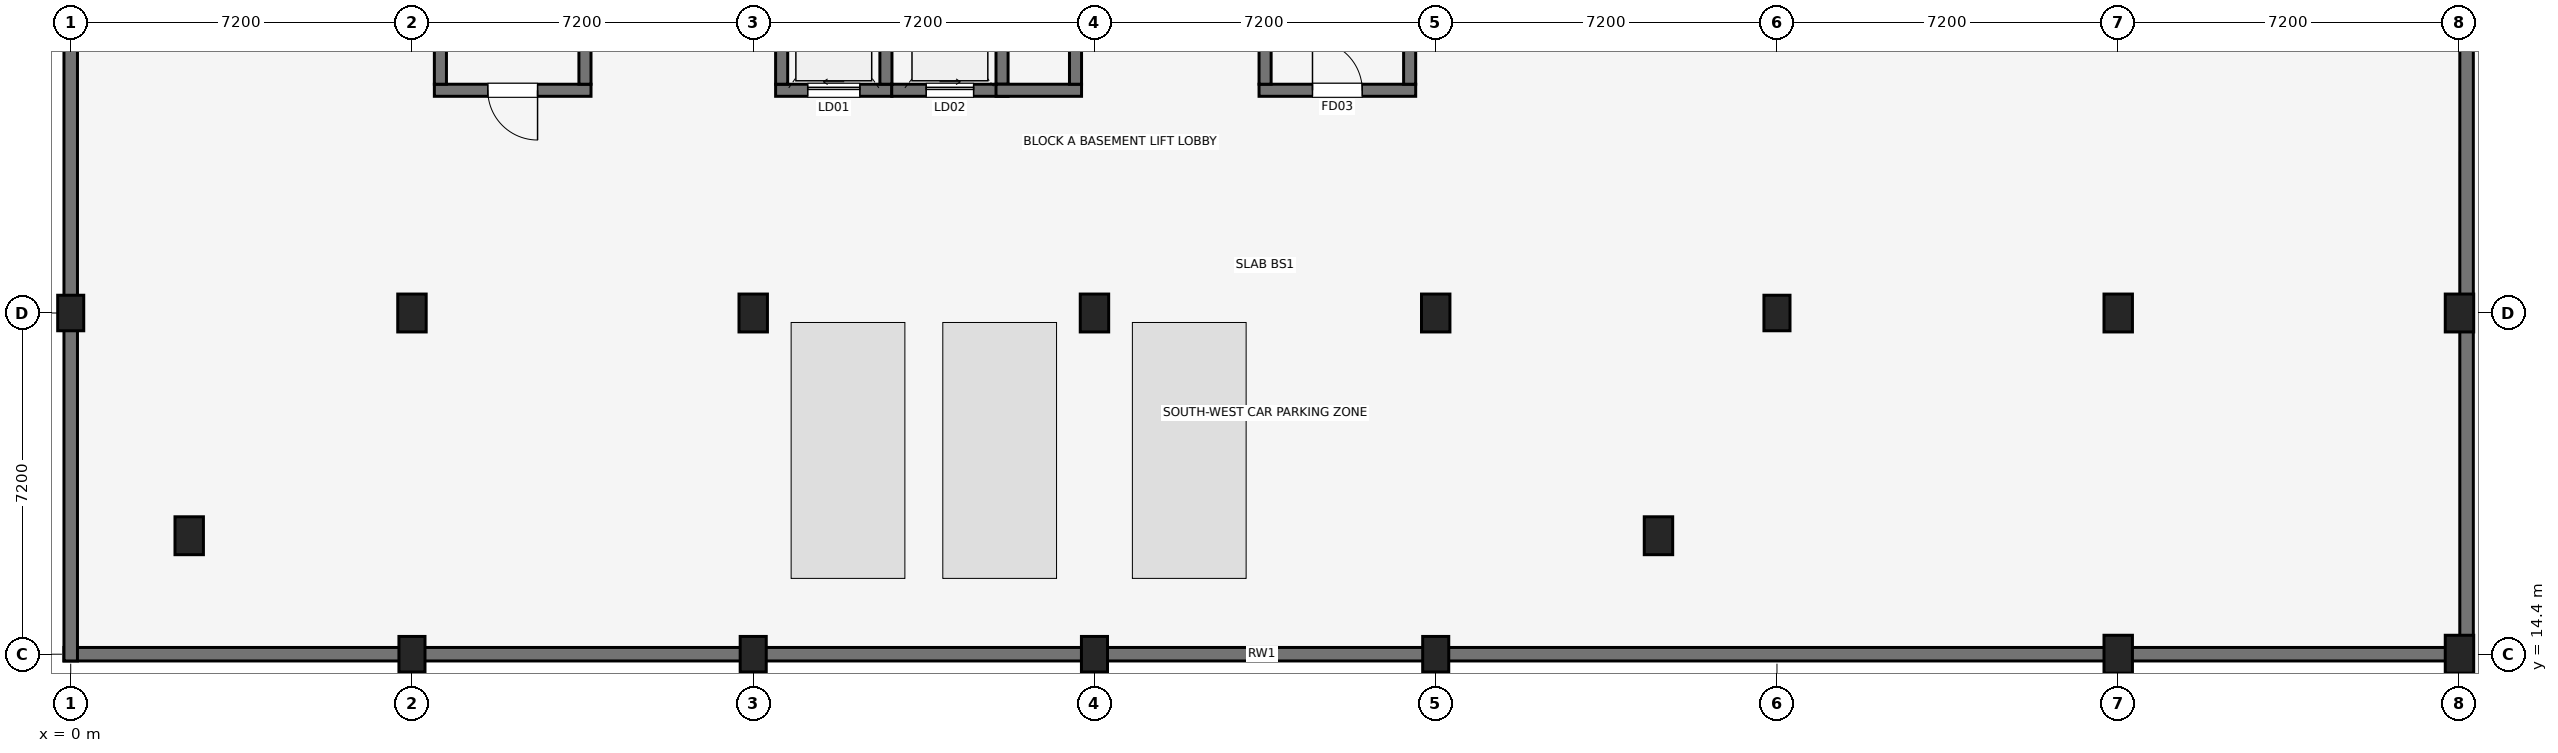
"""IFC4 building model, lengths in metres.
Left out: names, types, materials, properties, quantities, classifications, styles, units other than length and angle.
Written with IfcOpenShell. Run it as: python <this file> out.ifc"""

import sys

from ifc_helpers import new_model, si_unit, direction, frame, frame_2d, origin, origin_2d, place, context, subcontext, project, spatial, rectangle, extrude, element, fill, save


model = new_model("IFC4")
c1 = context("Model", 3, precision=1e-05, world=origin(), true_north=direction((0.0, 1.0)))
c2 = subcontext(c1, "Body", "Model", "MODEL_VIEW")
j1 = project(units=[si_unit("LENGTHUNIT", "METRE"), si_unit("PLANEANGLEUNIT", "RADIAN")], contexts=[c1])
p1 = place(None, origin())
s1 = spatial("IfcSite", under=j1, at=p1, CompositionType="ELEMENT")
p2 = place(p1, origin())
s2 = spatial("IfcBuilding", under=s1, at=p2, CompositionType="ELEMENT")
p3 = place(p2, frame((0.0, 0.0, -3.6)))
s3 = spatial("IfcBuildingStorey", under=s2, at=p3, CompositionType="ELEMENT", Elevation=-3.6)
p4 = place(p3, frame((-0.143, 14.4, 0.0), z_axis=(0.0, 0.0, 1.0), x_axis=(1.0, 0.0, 0.0)))
e1 = element("IfcWall", 1, at=p4, inside=s3, PredefinedType="USERDEFINED", context=c2, shape_type="SweptSolid", body=[
    extrude(rectangle(XDim=50.542, YDim=0.285, at=frame_2d((25.271, 0.0))), origin(), (0.0, 0.0, 1.0), 3.6),
])
p5 = place(p3, frame((0.0, 14.258, 0.0), z_axis=(0.0, 0.0, 1.0), x_axis=(0.0, 1.0, 0.0)))
e2 = element("IfcWall", 2, at=p5, inside=s3, PredefinedType="USERDEFINED", context=c2, shape_type="SweptSolid", body=[
    extrude(rectangle(XDim=79.485, YDim=0.285, at=frame_2d((39.742, 0.0))), origin(), (0.0, 0.0, 1.0), 3.6),
])
p6 = place(p3, frame((50.55, 4.2, 0.0), z_axis=(0.0, 0.0, 1.0), x_axis=(0.0, 1.0, 0.0)))
e3 = element("IfcWall", 3, at=p6, inside=s3, PredefinedType="USERDEFINED", context=c2, shape_type="SweptSolid", body=[
    extrude(rectangle(XDim=10.05, YDim=0.285, at=frame_2d((5.025, 0.0))), origin(), (0.0, 0.0, 1.0), 4.72),
])
p7 = place(p3, frame((50.55, 14.55, 0.0), z_axis=(0.0, 0.0, 1.0), x_axis=(0.0, 1.0, 0.0)))
e4 = element("IfcWall", 4, at=p7, inside=s3, PredefinedType="USERDEFINED", context=c2, shape_type="SweptSolid", body=[
    extrude(rectangle(XDim=16.35, YDim=0.285, at=frame_2d((8.175, 0.0))), origin(), (0.0, 0.0, 1.0), 3.6),
])
for number, where, z_axis, x_axis in (
    (5, (43.2, 14.4, -0.26), (0.0, 0.0, 1.0), (1.0, 0.0, 0.0)),
    (6, (43.2, 21.6, -0.26), (0.0, 0.0, 1.0), (1.0, 0.0, 0.0)),
    (7, (50.4, 14.4, -0.26), (0.0, 0.0, 1.0), (1.0, 0.0, 0.0)),
    (8, (50.4, 21.6, -0.26), (0.0, 0.0, 1.0), (1.0, 0.0, 0.0)),
    (9, (2.5, 16.9, -0.26), (0.0, 0.0, 1.0), (1.0, 0.0, 0.0)),
):
    element("IfcColumn", number, at=place(p3, frame(where, z_axis=z_axis, x_axis=x_axis)), inside=s3, PredefinedType="COLUMN", context=c2, shape_type="SweptSolid", body=[
        extrude(rectangle(XDim=0.6, YDim=0.8, at=origin_2d()), origin(), (0.0, 0.0, 1.0), 3.86),
    ])
for number, where, z_axis, x_axis in (
    (10, (0.0, 21.6, -0.26), (0.0, 0.0, 1.0), (1.0, 0.0, 0.0)),
    (11, (7.2, 14.4, -0.26), (0.0, 0.0, 1.0), (1.0, 0.0, 0.0)),
):
    element("IfcColumn", number, at=place(p3, frame(where, z_axis=z_axis, x_axis=x_axis)), inside=s3, PredefinedType="COLUMN", context=c2, shape_type="SweptSolid", body=[
        extrude(rectangle(XDim=0.55, YDim=0.75, at=origin_2d()), origin(), (0.0, 0.0, 1.0), 3.86),
    ])
p8 = place(p3, frame((7.2, 21.6, -0.26), z_axis=(0.0, 0.0, 1.0), x_axis=(1.0, 0.0, 0.0)))
e12 = element("IfcColumn", 12, at=p8, inside=s3, PredefinedType="COLUMN", context=c2, shape_type="SweptSolid", body=[
    extrude(rectangle(XDim=0.6, YDim=0.8, at=origin_2d()), origin(), (0.0, 0.0, 1.0), 3.86),
])
p9 = place(p3, frame((14.4, 14.4, -0.26), z_axis=(0.0, 0.0, 1.0), x_axis=(1.0, 0.0, 0.0)))
e13 = element("IfcColumn", 13, at=p9, inside=s3, PredefinedType="COLUMN", context=c2, shape_type="SweptSolid", body=[
    extrude(rectangle(XDim=0.55, YDim=0.75, at=origin_2d()), origin(), (0.0, 0.0, 1.0), 3.86),
])
p10 = place(p3, frame((14.4, 21.6, -0.26), z_axis=(0.0, 0.0, 1.0), x_axis=(1.0, 0.0, 0.0)))
e14 = element("IfcColumn", 14, at=p10, inside=s3, PredefinedType="COLUMN", context=c2, shape_type="SweptSolid", body=[
    extrude(rectangle(XDim=0.6, YDim=0.8, at=origin_2d()), origin(), (0.0, 0.0, 1.0), 3.86),
])
p11 = place(p3, frame((21.6, 14.4, -0.26), z_axis=(0.0, 0.0, 1.0), x_axis=(1.0, 0.0, 0.0)))
e15 = element("IfcColumn", 15, at=p11, inside=s3, PredefinedType="COLUMN", context=c2, shape_type="SweptSolid", body=[
    extrude(rectangle(XDim=0.55, YDim=0.75, at=origin_2d()), origin(), (0.0, 0.0, 1.0), 3.86),
])
p12 = place(p3, frame((21.6, 21.6, -0.26), z_axis=(0.0, 0.0, 1.0), x_axis=(1.0, 0.0, 0.0)))
e16 = element("IfcColumn", 16, at=p12, inside=s3, PredefinedType="COLUMN", context=c2, shape_type="SweptSolid", body=[
    extrude(rectangle(XDim=0.6, YDim=0.8, at=origin_2d()), origin(), (0.0, 0.0, 1.0), 3.86),
])
p13 = place(p3, frame((28.8, 14.4, -0.26), z_axis=(0.0, 0.0, 1.0), x_axis=(1.0, 0.0, 0.0)))
e17 = element("IfcColumn", 17, at=p13, inside=s3, PredefinedType="COLUMN", context=c2, shape_type="SweptSolid", body=[
    extrude(rectangle(XDim=0.55, YDim=0.75, at=origin_2d()), origin(), (0.0, 0.0, 1.0), 3.86),
])
for number, where, z_axis, x_axis in (
    (18, (28.8, 21.6, -0.26), (0.0, 0.0, 1.0), (1.0, 0.0, 0.0)),
    (19, (33.5, 16.9, -0.26), (0.0, 0.0, 1.0), (1.0, 0.0, 0.0)),
):
    element("IfcColumn", number, at=place(p3, frame(where, z_axis=z_axis, x_axis=x_axis)), inside=s3, PredefinedType="COLUMN", context=c2, shape_type="SweptSolid", body=[
        extrude(rectangle(XDim=0.6, YDim=0.8, at=origin_2d()), origin(), (0.0, 0.0, 1.0), 3.86),
    ])
p14 = place(p3, frame((36.0, 21.6, -0.26), z_axis=(0.0, 0.0, 1.0), x_axis=(1.0, 0.0, 0.0)))
e20 = element("IfcColumn", 20, at=p14, inside=s3, PredefinedType="COLUMN", context=c2, shape_type="SweptSolid", body=[
    extrude(rectangle(XDim=0.55, YDim=0.75, at=origin_2d()), origin(), (0.0, 0.0, 1.0), 3.86),
])
p15 = place(p3, frame((7.673, 26.3, 0.0), z_axis=(0.0, 0.0, 1.0), x_axis=(1.0, 0.0, 0.0)))
e21 = element("IfcWall", 21, at=p15, inside=s3, PredefinedType="SHEAR", context=c2, shape_type="SweptSolid", body=[
    extrude(rectangle(XDim=3.305, YDim=0.255, at=frame_2d((1.652, 0.0))), origin(), (0.0, 0.0, 1.0), 3.6),
])
p16 = place(p15, frame((2.177, 0.0, 0.0), z_axis=(0.0, 0.0, 1.0), x_axis=(-1.0, 0.0, 0.0)))
e22 = element("IfcOpeningElement", 22, at=p16, cuts=e21, PredefinedType="OPENING", context=c2, shape_type="SweptSolid", body=[
    extrude(rectangle(XDim=1.05, YDim=2.12, at=frame_2d((0.525, 1.06))), frame((0.0, 0.137, 0.0), z_axis=(0.0, -1.0, 0.0), x_axis=(1.0, 0.0, 0.0)), (0.0, 0.0, 1.0), 0.275),
])
for number, where, z_axis, x_axis in (
    (23, (7.8, 26.427, 0.0), (0.0, 0.0, 1.0), (0.0, 1.0, 0.0)),
    (24, (10.85, 26.427, 0.0), (0.0, 0.0, 1.0), (0.0, 1.0, 0.0)),
):
    element("IfcWall", number, at=place(p3, frame(where, z_axis=z_axis, x_axis=x_axis)), inside=s3, PredefinedType="SHEAR", context=c2, shape_type="SweptSolid", body=[
        extrude(rectangle(XDim=6.295, YDim=0.255, at=frame_2d((3.147, 0.0))), origin(), (0.0, 0.0, 1.0), 3.6),
    ])
p17 = place(p3, frame((25.073, 26.3, 0.0), z_axis=(0.0, 0.0, 1.0), x_axis=(1.0, 0.0, 0.0)))
e25 = element("IfcWall", 25, at=p17, inside=s3, PredefinedType="SHEAR", context=c2, shape_type="SweptSolid", body=[
    extrude(rectangle(XDim=3.305, YDim=0.255, at=frame_2d((1.652, 0.0))), origin(), (0.0, 0.0, 1.0), 3.6),
])
p18 = place(p17, frame((1.127, 0.0, 0.0)))
e26 = element("IfcOpeningElement", 26, at=p18, cuts=e25, PredefinedType="OPENING", context=c2, shape_type="SweptSolid", body=[
    extrude(rectangle(XDim=1.05, YDim=2.12, at=frame_2d((0.525, 1.06))), frame((0.0, 0.137, 0.0), z_axis=(0.0, -1.0, 0.0), x_axis=(1.0, 0.0, 0.0)), (0.0, 0.0, 1.0), 0.275),
])
for number, where, z_axis, x_axis in (
    (27, (25.2, 26.427, 0.0), (0.0, 0.0, 1.0), (0.0, 1.0, 0.0)),
    (28, (28.25, 26.427, 0.0), (0.0, 0.0, 1.0), (0.0, 1.0, 0.0)),
):
    element("IfcWall", number, at=place(p3, frame(where, z_axis=z_axis, x_axis=x_axis)), inside=s3, PredefinedType="SHEAR", context=c2, shape_type="SweptSolid", body=[
        extrude(rectangle(XDim=6.295, YDim=0.255, at=frame_2d((3.147, 0.0))), origin(), (0.0, 0.0, 1.0), 3.6),
    ])
p19 = place(p3, frame((14.873, 26.3, 0.0), z_axis=(0.0, 0.0, 1.0), x_axis=(1.0, 0.0, 0.0)))
e29 = element("IfcWall", 29, at=p19, inside=s3, PredefinedType="SHEAR", context=c2, shape_type="SweptSolid", body=[
    extrude(rectangle(XDim=2.455, YDim=0.255, at=frame_2d((1.228, 0.0))), origin(), (0.0, 0.0, 1.0), 3.6),
])
p20 = place(p19, frame((0.677, 0.0, 0.0)))
e30 = element("IfcOpeningElement", 30, at=p20, cuts=e29, PredefinedType="OPENING", context=c2, shape_type="SweptSolid", body=[
    extrude(rectangle(XDim=1.1, YDim=2.15, at=frame_2d((0.55, 1.075))), frame((0.0, 0.137, 0.0), z_axis=(0.0, -1.0, 0.0), x_axis=(1.0, 0.0, 0.0)), (0.0, 0.0, 1.0), 0.275),
])
for number, where, z_axis, x_axis in (
    (31, (15.0, 26.427, 0.0), (0.0, 0.0, 1.0), (0.0, 1.0, 0.0)),
    (32, (17.2, 26.427, 0.0), (0.0, 0.0, 1.0), (0.0, 1.0, 0.0)),
):
    element("IfcWall", number, at=place(p3, frame(where, z_axis=z_axis, x_axis=x_axis)), inside=s3, PredefinedType="SHEAR", context=c2, shape_type="SweptSolid", body=[
        extrude(rectangle(XDim=2.545, YDim=0.255, at=frame_2d((1.272, 0.0))), origin(), (0.0, 0.0, 1.0), 3.6),
    ])
p21 = place(p3, frame((17.323, 26.3, 0.0), z_axis=(0.0, 0.0, 1.0), x_axis=(1.0, 0.0, 0.0)))
e33 = element("IfcWall", 33, at=p21, inside=s3, PredefinedType="SHEAR", context=c2, shape_type="SweptSolid", body=[
    extrude(rectangle(XDim=2.455, YDim=0.255, at=frame_2d((1.228, 0.0))), origin(), (0.0, 0.0, 1.0), 3.6),
])
p22 = place(p21, frame((0.728, 0.0, 0.0)))
e34 = element("IfcOpeningElement", 34, at=p22, cuts=e33, PredefinedType="OPENING", context=c2, shape_type="SweptSolid", body=[
    extrude(rectangle(XDim=1.0, YDim=2.15, at=frame_2d((0.5, 1.075))), frame((0.0, 0.137, 0.0), z_axis=(0.0, -1.0, 0.0), x_axis=(1.0, 0.0, 0.0)), (0.0, 0.0, 1.0), 0.275),
])
p23 = place(p3, frame((19.65, 26.427, 0.0), z_axis=(0.0, 0.0, 1.0), x_axis=(0.0, 1.0, 0.0)))
e35 = element("IfcWall", 35, at=p23, inside=s3, PredefinedType="SHEAR", context=c2, shape_type="SweptSolid", body=[
    extrude(rectangle(XDim=2.245, YDim=0.255, at=frame_2d((1.123, 0.0))), origin(), (0.0, 0.0, 1.0), 3.6),
])
p24 = place(p3, frame((19.522, 26.3, 0.0), z_axis=(0.0, 0.0, 1.0), x_axis=(1.0, 0.0, 0.0)))
e36 = element("IfcWall", 36, at=p24, inside=s3, PredefinedType="SHEAR", context=c2, shape_type="SweptSolid", body=[
    extrude(rectangle(XDim=1.805, YDim=0.255, at=frame_2d((0.902, 0.0))), origin(), (0.0, 0.0, 1.0), 3.6),
])
p25 = place(p3, frame((21.2, 26.427, 0.0), z_axis=(0.0, 0.0, 1.0), x_axis=(0.0, 1.0, 0.0)))
e37 = element("IfcWall", 37, at=p25, inside=s3, PredefinedType="SHEAR", context=c2, shape_type="SweptSolid", body=[
    extrude(rectangle(XDim=1.945, YDim=0.255, at=frame_2d((0.973, 0.0))), origin(), (0.0, 0.0, 1.0), 3.6),
])
p26 = place(p16, origin())
e38 = element("IfcDoor", 38, at=p26, inside=s3, OperationType="SINGLE_SWING_RIGHT", PredefinedType="DOOR", context=c2, shape_type="SweptSolid", body=[
    extrude(rectangle(XDim=1.05, YDim=2.12, at=frame_2d((0.525, 1.06))), frame((0.0, 0.025, 0.0), z_axis=(0.0, -1.0, 0.0), x_axis=(1.0, 0.0, 0.0)), (0.0, 0.0, 1.0), 0.05),
])
fill(e22, e38)
p27 = place(p18, origin())
e39 = element("IfcDoor", 39, at=p27, inside=s3, OperationType="SINGLE_SWING_LEFT", PredefinedType="DOOR", context=c2, shape_type="SweptSolid", body=[
    extrude(rectangle(XDim=1.05, YDim=2.12, at=frame_2d((0.525, 1.06))), frame((0.0, 0.025, 0.0), z_axis=(0.0, -1.0, 0.0), x_axis=(1.0, 0.0, 0.0)), (0.0, 0.0, 1.0), 0.05),
])
fill(e26, e39)
p28 = place(p20, origin())
e40 = element("IfcDoor", 40, at=p28, inside=s3, OperationType="SLIDING_TO_LEFT", PredefinedType="DOOR", context=c2, shape_type="SweptSolid", body=[
    extrude(rectangle(XDim=1.1, YDim=2.15, at=frame_2d((0.55, 1.075))), frame((0.0, 0.025, 0.0), z_axis=(0.0, -1.0, 0.0), x_axis=(1.0, 0.0, 0.0)), (0.0, 0.0, 1.0), 0.05),
])
fill(e30, e40)
p29 = place(p22, origin())
e41 = element("IfcDoor", 41, at=p29, inside=s3, OperationType="SLIDING_TO_RIGHT", PredefinedType="DOOR", context=c2, shape_type="SweptSolid", body=[
    extrude(rectangle(XDim=1.0, YDim=2.15, at=frame_2d((0.5, 1.075))), frame((0.0, 0.025, 0.0), z_axis=(0.0, -1.0, 0.0), x_axis=(1.0, 0.0, 0.0)), (0.0, 0.0, 1.0), 0.05),
])
fill(e34, e41)
save(model, sys.argv[1])
